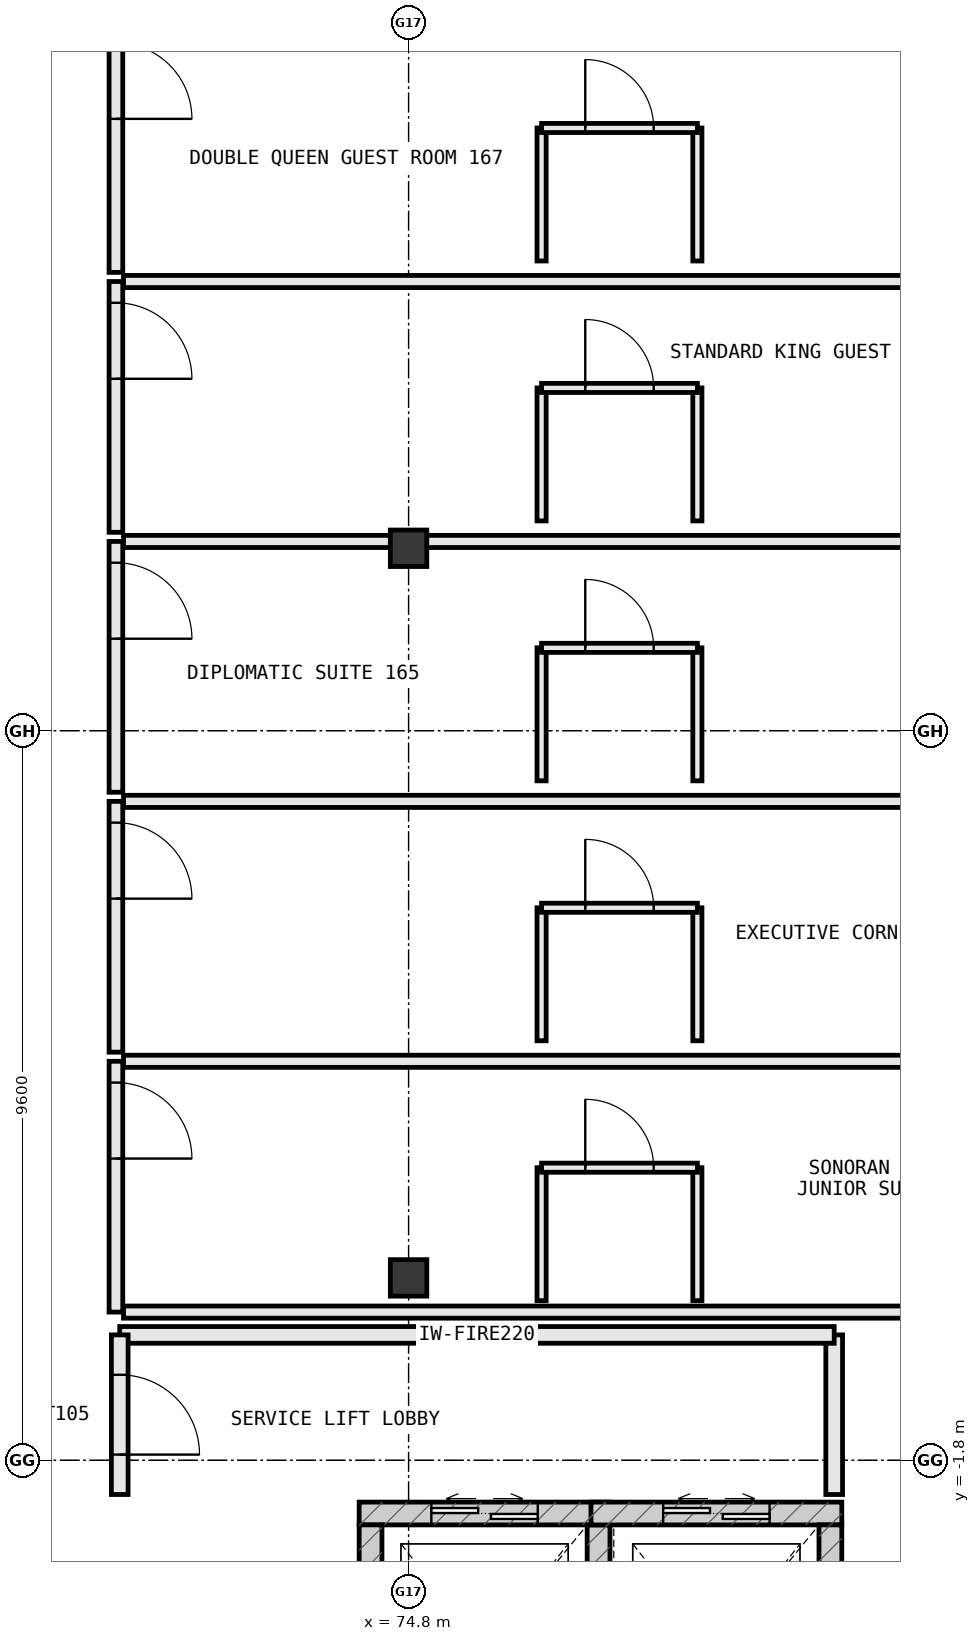
"""IFC4 building model, lengths in metres.
Left out: names, types, materials, properties, quantities, classifications, styles, units other than length and angle.
Written with IfcOpenShell. Run it as: python <this file> out.ifc"""

import sys

from ifc_helpers import new_model, si_unit, direction, frame, frame_2d, origin, origin_2d, place, context, subcontext, project, spatial, rectangle, extrude, element, fill, save


model = new_model("IFC4")
c1 = context("Model", 3, precision=1e-05, world=origin(), true_north=direction((0.0, 1.0)))
c2 = subcontext(c1, "Body", "Model", "MODEL_VIEW")
j1 = project(units=[si_unit("LENGTHUNIT", "METRE"), si_unit("PLANEANGLEUNIT", "RADIAN")], contexts=[c1])
p1 = place(None, origin())
s1 = spatial("IfcSite", under=j1, at=p1, CompositionType="ELEMENT")
p2 = place(p1, origin())
s2 = spatial("IfcBuilding", under=s1, at=p2, CompositionType="ELEMENT")
p3 = place(p2, frame((0.0, 0.0, 23.8)))
s3 = spatial("IfcBuildingStorey", under=s2, at=p3, CompositionType="ELEMENT", Elevation=23.8)
for number, where, z_axis, x_axis in (
    (1, (74.8, 0.6, 0.0), (0.0, 0.0, 1.0), (1.0, 0.0, 0.0)),
    (2, (74.8, 10.2, 0.0), (0.0, 0.0, 1.0), (1.0, 0.0, 0.0)),
):
    element("IfcColumn", number, at=place(p3, frame(where, z_axis=z_axis, x_axis=x_axis)), inside=s3, PredefinedType="COLUMN", context=c2, shape_type="SweptSolid", body=[
        extrude(rectangle(XDim=0.48, YDim=0.48, at=origin_2d()), origin(), (0.0, 0.0, 1.0), 3.8),
    ])
p4 = place(p3, frame((77.45, -2.5, 0.0), z_axis=(0.0, 0.0, 1.0), x_axis=(-1.0, 0.0, 0.0)))
e3 = element("IfcWall", 3, at=p4, inside=s3, PredefinedType="SHEAR", context=c2, shape_type="SweptSolid", body=[
    extrude(rectangle(XDim=3.3, YDim=0.3, at=frame_2d((1.65, 0.0))), origin(), (0.0, 0.0, 1.0), 3.8),
])
p5 = place(p4, frame((0.95, 0.0, 0.0)))
e4 = element("IfcOpeningElement", 4, at=p5, cuts=e3, PredefinedType="OPENING", context=c2, shape_type="SweptSolid", body=[
    extrude(rectangle(XDim=1.4, YDim=2.2, at=frame_2d((0.7, 1.1))), frame((0.0, 0.162, 0.0), z_axis=(0.0, -1.0, 0.0), x_axis=(1.0, 0.0, 0.0)), (0.0, 0.0, 1.0), 0.324),
])
for number, where, z_axis, x_axis in (
    (5, (77.3, -5.95, 0.0), (0.0, 0.0, 1.0), (0.0, 1.0, 0.0)),
    (6, (74.3, -2.65, 0.0), (0.0, 0.0, 1.0), (0.0, -1.0, 0.0)),
):
    element("IfcWall", number, at=place(p3, frame(where, z_axis=z_axis, x_axis=x_axis)), inside=s3, PredefinedType="SHEAR", context=c2, shape_type="SweptSolid", body=[
        extrude(rectangle(XDim=3.3, YDim=0.3, at=frame_2d((1.65, 0.0))), origin(), (0.0, 0.0, 1.0), 3.8),
    ])
p6 = place(p3, frame((80.5, -2.5, 0.0), z_axis=(0.0, 0.0, 1.0), x_axis=(-1.0, 0.0, 0.0)))
e7 = element("IfcWall", 7, at=p6, inside=s3, PredefinedType="SHEAR", context=c2, shape_type="SweptSolid", body=[
    extrude(rectangle(XDim=3.3, YDim=0.3, at=frame_2d((1.65, 0.0))), origin(), (0.0, 0.0, 1.0), 3.8),
])
p7 = place(p6, frame((0.95, 0.0, 0.0)))
e8 = element("IfcOpeningElement", 8, at=p7, cuts=e7, PredefinedType="OPENING", context=c2, shape_type="SweptSolid", body=[
    extrude(rectangle(XDim=1.4, YDim=2.2, at=frame_2d((0.7, 1.1))), frame((0.0, 0.162, 0.0), z_axis=(0.0, -1.0, 0.0), x_axis=(1.0, 0.0, 0.0)), (0.0, 0.0, 1.0), 0.324),
])
p8 = place(p3, frame((80.35, -5.95, 0.0), z_axis=(0.0, 0.0, 1.0), x_axis=(0.0, 1.0, 0.0)))
e9 = element("IfcWall", 9, at=p8, inside=s3, PredefinedType="SHEAR", context=c2, shape_type="SweptSolid", body=[
    extrude(rectangle(XDim=3.3, YDim=0.3, at=frame_2d((1.65, 0.0))), origin(), (0.0, 0.0, 1.0), 3.8),
])
p9 = place(p3, frame((80.4, -2.25, 0.0), z_axis=(0.0, 0.0, 1.0), x_axis=(0.0, 1.0, 0.0)))
e10 = element("IfcWall", 10, at=p9, inside=s3, PredefinedType="STANDARD", context=c2, shape_type="SweptSolid", body=[
    extrude(rectangle(XDim=2.1, YDim=0.22, at=frame_2d((1.05, 0.0))), origin(), (0.0, 0.0, 1.0), 3.55),
])
p10 = place(p3, frame((80.4, -0.15, 0.0), z_axis=(0.0, 0.0, 1.0), x_axis=(-1.0, 0.0, 0.0)))
e11 = element("IfcWall", 11, at=p10, inside=s3, PredefinedType="STANDARD", context=c2, shape_type="SweptSolid", body=[
    extrude(rectangle(XDim=9.4, YDim=0.22, at=frame_2d((4.7, 0.0))), origin(), (0.0, 0.0, 1.0), 3.55),
])
p11 = place(p3, frame((71.0, -0.15, 0.0), z_axis=(0.0, 0.0, 1.0), x_axis=(0.0, -1.0, 0.0)))
e12 = element("IfcWall", 12, at=p11, inside=s3, PredefinedType="STANDARD", context=c2, shape_type="SweptSolid", body=[
    extrude(rectangle(XDim=2.1, YDim=0.22, at=frame_2d((1.05, 0.0))), origin(), (0.0, 0.0, 1.0), 3.55),
])
p12 = place(p11, frame((0.525, 0.0, 0.0)))
e13 = element("IfcOpeningElement", 13, at=p12, cuts=e12, PredefinedType="OPENING", context=c2, shape_type="SweptSolid", body=[
    extrude(rectangle(XDim=1.05, YDim=2.2, at=frame_2d((0.525, 1.1))), frame((0.0, 0.122, 0.0), z_axis=(0.0, -1.0, 0.0), x_axis=(1.0, 0.0, 0.0)), (0.0, 0.0, 1.0), 0.244),
])
p13 = place(p3, frame((70.95, 3.45, 0.0), z_axis=(0.0, 0.0, 1.0), x_axis=(0.0, -1.0, 0.0)))
e14 = element("IfcWall", 14, at=p13, inside=s3, PredefinedType="PARTITIONING", context=c2, shape_type="SweptSolid", body=[
    extrude(rectangle(XDim=3.3, YDim=0.18, at=frame_2d((1.65, 0.0))), origin(), (0.0, 0.0, 1.0), 3.55),
])
p14 = place(p13, frame((0.28, 0.0, 0.0)))
e15 = element("IfcOpeningElement", 15, at=p14, cuts=e14, PredefinedType="OPENING", context=c2, shape_type="SweptSolid", body=[
    extrude(rectangle(XDim=1.0, YDim=2.2, at=frame_2d((0.5, 1.1))), frame((0.0, 0.102, 0.0), z_axis=(0.0, -1.0, 0.0), x_axis=(1.0, 0.0, 0.0)), (0.0, 0.0, 1.0), 0.204),
])
for number, where, z_axis, x_axis in (
    (16, (71.05, 0.15, 0.0), (0.0, 0.0, 1.0), (1.0, 0.0, 0.0)),
    (17, (71.05, 3.45, 0.0), (0.0, 0.0, 1.0), (1.0, 0.0, 0.0)),
):
    element("IfcWall", number, at=place(p3, frame(where, z_axis=z_axis, x_axis=x_axis)), inside=s3, PredefinedType="PARTITIONING", context=c2, shape_type="SweptSolid", body=[
        extrude(rectangle(XDim=12.79, YDim=0.16, at=frame_2d((6.395, 0.0))), origin(), (0.0, 0.0, 1.0), 3.55),
    ])
for number, where, z_axis, x_axis in (
    (18, (76.55, 0.3, 0.0), (0.0, 0.0, 1.0), (0.0, 1.0, 0.0)),
    (19, (78.6, 0.3, 0.0), (0.0, 0.0, 1.0), (0.0, 1.0, 0.0)),
):
    element("IfcWall", number, at=place(p3, frame(where, z_axis=z_axis, x_axis=x_axis)), inside=s3, PredefinedType="PARTITIONING", context=c2, shape_type="SweptSolid", body=[
        extrude(rectangle(XDim=1.75, YDim=0.12, at=frame_2d((0.875, 0.0))), origin(), (0.0, 0.0, 1.0), 3.55),
    ])
p15 = place(p3, frame((76.55, 2.05, 0.0), z_axis=(0.0, 0.0, 1.0), x_axis=(1.0, 0.0, 0.0)))
e20 = element("IfcWall", 20, at=p15, inside=s3, PredefinedType="PARTITIONING", context=c2, shape_type="SweptSolid", body=[
    extrude(rectangle(XDim=2.05, YDim=0.12, at=frame_2d((1.025, 0.0))), origin(), (0.0, 0.0, 1.0), 3.55),
])
p16 = place(p15, frame((0.575, 0.0, 0.0)))
e21 = element("IfcOpeningElement", 21, at=p16, cuts=e20, PredefinedType="OPENING", context=c2, shape_type="SweptSolid", body=[
    extrude(rectangle(XDim=0.9, YDim=2.15, at=frame_2d((0.45, 1.075))), frame((0.0, 0.072, 0.0), z_axis=(0.0, -1.0, 0.0), x_axis=(1.0, 0.0, 0.0)), (0.0, 0.0, 1.0), 0.144),
])
p17 = place(p3, frame((70.95, 6.87, 0.0), z_axis=(0.0, 0.0, 1.0), x_axis=(0.0, -1.0, 0.0)))
e22 = element("IfcWall", 22, at=p17, inside=s3, PredefinedType="PARTITIONING", context=c2, shape_type="SweptSolid", body=[
    extrude(rectangle(XDim=3.3, YDim=0.18, at=frame_2d((1.65, 0.0))), origin(), (0.0, 0.0, 1.0), 3.55),
])
p18 = place(p17, frame((0.28, 0.0, 0.0)))
e23 = element("IfcOpeningElement", 23, at=p18, cuts=e22, PredefinedType="OPENING", context=c2, shape_type="SweptSolid", body=[
    extrude(rectangle(XDim=1.0, YDim=2.2, at=frame_2d((0.5, 1.1))), frame((0.0, 0.102, 0.0), z_axis=(0.0, -1.0, 0.0), x_axis=(1.0, 0.0, 0.0)), (0.0, 0.0, 1.0), 0.204),
])
p19 = place(p3, frame((71.05, 6.87, 0.0), z_axis=(0.0, 0.0, 1.0), x_axis=(1.0, 0.0, 0.0)))
e24 = element("IfcWall", 24, at=p19, inside=s3, PredefinedType="PARTITIONING", context=c2, shape_type="SweptSolid", body=[
    extrude(rectangle(XDim=12.79, YDim=0.16, at=frame_2d((6.395, 0.0))), origin(), (0.0, 0.0, 1.0), 3.55),
])
for number, where, z_axis, x_axis in (
    (25, (76.55, 3.72, 0.0), (0.0, 0.0, 1.0), (0.0, 1.0, 0.0)),
    (26, (78.6, 3.72, 0.0), (0.0, 0.0, 1.0), (0.0, 1.0, 0.0)),
):
    element("IfcWall", number, at=place(p3, frame(where, z_axis=z_axis, x_axis=x_axis)), inside=s3, PredefinedType="PARTITIONING", context=c2, shape_type="SweptSolid", body=[
        extrude(rectangle(XDim=1.75, YDim=0.12, at=frame_2d((0.875, 0.0))), origin(), (0.0, 0.0, 1.0), 3.55),
    ])
p20 = place(p3, frame((76.55, 5.47, 0.0), z_axis=(0.0, 0.0, 1.0), x_axis=(1.0, 0.0, 0.0)))
e27 = element("IfcWall", 27, at=p20, inside=s3, PredefinedType="PARTITIONING", context=c2, shape_type="SweptSolid", body=[
    extrude(rectangle(XDim=2.05, YDim=0.12, at=frame_2d((1.025, 0.0))), origin(), (0.0, 0.0, 1.0), 3.55),
])
p21 = place(p20, frame((0.575, 0.0, 0.0)))
e28 = element("IfcOpeningElement", 28, at=p21, cuts=e27, PredefinedType="OPENING", context=c2, shape_type="SweptSolid", body=[
    extrude(rectangle(XDim=0.9, YDim=2.15, at=frame_2d((0.45, 1.075))), frame((0.0, 0.072, 0.0), z_axis=(0.0, -1.0, 0.0), x_axis=(1.0, 0.0, 0.0)), (0.0, 0.0, 1.0), 0.144),
])
p22 = place(p3, frame((70.95, 10.29, 0.0), z_axis=(0.0, 0.0, 1.0), x_axis=(0.0, -1.0, 0.0)))
e29 = element("IfcWall", 29, at=p22, inside=s3, PredefinedType="PARTITIONING", context=c2, shape_type="SweptSolid", body=[
    extrude(rectangle(XDim=3.3, YDim=0.18, at=frame_2d((1.65, 0.0))), origin(), (0.0, 0.0, 1.0), 3.55),
])
p23 = place(p22, frame((0.28, 0.0, 0.0)))
e30 = element("IfcOpeningElement", 30, at=p23, cuts=e29, PredefinedType="OPENING", context=c2, shape_type="SweptSolid", body=[
    extrude(rectangle(XDim=1.0, YDim=2.2, at=frame_2d((0.5, 1.1))), frame((0.0, 0.102, 0.0), z_axis=(0.0, -1.0, 0.0), x_axis=(1.0, 0.0, 0.0)), (0.0, 0.0, 1.0), 0.204),
])
p24 = place(p3, frame((71.05, 10.29, 0.0), z_axis=(0.0, 0.0, 1.0), x_axis=(1.0, 0.0, 0.0)))
e31 = element("IfcWall", 31, at=p24, inside=s3, PredefinedType="PARTITIONING", context=c2, shape_type="SweptSolid", body=[
    extrude(rectangle(XDim=12.79, YDim=0.16, at=frame_2d((6.395, 0.0))), origin(), (0.0, 0.0, 1.0), 2.905),
])
for number, where, z_axis, x_axis in (
    (32, (76.55, 7.14, 0.0), (0.0, 0.0, 1.0), (0.0, 1.0, 0.0)),
    (33, (78.6, 7.14, 0.0), (0.0, 0.0, 1.0), (0.0, 1.0, 0.0)),
):
    element("IfcWall", number, at=place(p3, frame(where, z_axis=z_axis, x_axis=x_axis)), inside=s3, PredefinedType="PARTITIONING", context=c2, shape_type="SweptSolid", body=[
        extrude(rectangle(XDim=1.75, YDim=0.12, at=frame_2d((0.875, 0.0))), origin(), (0.0, 0.0, 1.0), 3.55),
    ])
p25 = place(p3, frame((76.55, 8.89, 0.0), z_axis=(0.0, 0.0, 1.0), x_axis=(1.0, 0.0, 0.0)))
e34 = element("IfcWall", 34, at=p25, inside=s3, PredefinedType="PARTITIONING", context=c2, shape_type="SweptSolid", body=[
    extrude(rectangle(XDim=2.05, YDim=0.12, at=frame_2d((1.025, 0.0))), origin(), (0.0, 0.0, 1.0), 3.55),
])
p26 = place(p25, frame((0.575, 0.0, 0.0)))
e35 = element("IfcOpeningElement", 35, at=p26, cuts=e34, PredefinedType="OPENING", context=c2, shape_type="SweptSolid", body=[
    extrude(rectangle(XDim=0.9, YDim=2.15, at=frame_2d((0.45, 1.075))), frame((0.0, 0.072, 0.0), z_axis=(0.0, -1.0, 0.0), x_axis=(1.0, 0.0, 0.0)), (0.0, 0.0, 1.0), 0.144),
])
p27 = place(p3, frame((70.95, 13.71, 0.0), z_axis=(0.0, 0.0, 1.0), x_axis=(0.0, -1.0, 0.0)))
e36 = element("IfcWall", 36, at=p27, inside=s3, PredefinedType="PARTITIONING", context=c2, shape_type="SweptSolid", body=[
    extrude(rectangle(XDim=3.3, YDim=0.18, at=frame_2d((1.65, 0.0))), origin(), (0.0, 0.0, 1.0), 3.55),
])
p28 = place(p27, frame((0.28, 0.0, 0.0)))
e37 = element("IfcOpeningElement", 37, at=p28, cuts=e36, PredefinedType="OPENING", context=c2, shape_type="SweptSolid", body=[
    extrude(rectangle(XDim=1.0, YDim=2.2, at=frame_2d((0.5, 1.1))), frame((0.0, 0.102, 0.0), z_axis=(0.0, -1.0, 0.0), x_axis=(1.0, 0.0, 0.0)), (0.0, 0.0, 1.0), 0.204),
])
p29 = place(p3, frame((71.05, 13.71, 0.0), z_axis=(0.0, 0.0, 1.0), x_axis=(1.0, 0.0, 0.0)))
e38 = element("IfcWall", 38, at=p29, inside=s3, PredefinedType="PARTITIONING", context=c2, shape_type="SweptSolid", body=[
    extrude(rectangle(XDim=12.79, YDim=0.16, at=frame_2d((6.395, 0.0))), origin(), (0.0, 0.0, 1.0), 3.55),
])
for number, where, z_axis, x_axis in (
    (39, (76.55, 10.56, 0.0), (0.0, 0.0, 1.0), (0.0, 1.0, 0.0)),
    (40, (78.6, 10.56, 0.0), (0.0, 0.0, 1.0), (0.0, 1.0, 0.0)),
):
    element("IfcWall", number, at=place(p3, frame(where, z_axis=z_axis, x_axis=x_axis)), inside=s3, PredefinedType="PARTITIONING", context=c2, shape_type="SweptSolid", body=[
        extrude(rectangle(XDim=1.75, YDim=0.12, at=frame_2d((0.875, 0.0))), origin(), (0.0, 0.0, 1.0), 3.55),
    ])
p30 = place(p3, frame((76.55, 12.31, 0.0), z_axis=(0.0, 0.0, 1.0), x_axis=(1.0, 0.0, 0.0)))
e41 = element("IfcWall", 41, at=p30, inside=s3, PredefinedType="PARTITIONING", context=c2, shape_type="SweptSolid", body=[
    extrude(rectangle(XDim=2.05, YDim=0.12, at=frame_2d((1.025, 0.0))), origin(), (0.0, 0.0, 1.0), 3.55),
])
p31 = place(p30, frame((0.575, 0.0, 0.0)))
e42 = element("IfcOpeningElement", 42, at=p31, cuts=e41, PredefinedType="OPENING", context=c2, shape_type="SweptSolid", body=[
    extrude(rectangle(XDim=0.9, YDim=2.15, at=frame_2d((0.45, 1.075))), frame((0.0, 0.072, 0.0), z_axis=(0.0, -1.0, 0.0), x_axis=(1.0, 0.0, 0.0)), (0.0, 0.0, 1.0), 0.144),
])
p32 = place(p3, frame((70.95, 17.13, 0.0), z_axis=(0.0, 0.0, 1.0), x_axis=(0.0, -1.0, 0.0)))
e43 = element("IfcWall", 43, at=p32, inside=s3, PredefinedType="PARTITIONING", context=c2, shape_type="SweptSolid", body=[
    extrude(rectangle(XDim=3.3, YDim=0.18, at=frame_2d((1.65, 0.0))), origin(), (0.0, 0.0, 1.0), 3.55),
])
p33 = place(p32, frame((0.28, 0.0, 0.0)))
e44 = element("IfcOpeningElement", 44, at=p33, cuts=e43, PredefinedType="OPENING", context=c2, shape_type="SweptSolid", body=[
    extrude(rectangle(XDim=1.0, YDim=2.2, at=frame_2d((0.5, 1.1))), frame((0.0, 0.102, 0.0), z_axis=(0.0, -1.0, 0.0), x_axis=(1.0, 0.0, 0.0)), (0.0, 0.0, 1.0), 0.204),
])
for number, where, z_axis, x_axis in (
    (45, (76.55, 13.98, 0.0), (0.0, 0.0, 1.0), (0.0, 1.0, 0.0)),
    (46, (78.6, 13.98, 0.0), (0.0, 0.0, 1.0), (0.0, 1.0, 0.0)),
):
    element("IfcWall", number, at=place(p3, frame(where, z_axis=z_axis, x_axis=x_axis)), inside=s3, PredefinedType="PARTITIONING", context=c2, shape_type="SweptSolid", body=[
        extrude(rectangle(XDim=1.75, YDim=0.12, at=frame_2d((0.875, 0.0))), origin(), (0.0, 0.0, 1.0), 3.55),
    ])
p34 = place(p3, frame((76.55, 15.73, 0.0), z_axis=(0.0, 0.0, 1.0), x_axis=(1.0, 0.0, 0.0)))
e47 = element("IfcWall", 47, at=p34, inside=s3, PredefinedType="PARTITIONING", context=c2, shape_type="SweptSolid", body=[
    extrude(rectangle(XDim=2.05, YDim=0.12, at=frame_2d((1.025, 0.0))), origin(), (0.0, 0.0, 1.0), 3.55),
])
p35 = place(p34, frame((0.575, 0.0, 0.0)))
e48 = element("IfcOpeningElement", 48, at=p35, cuts=e47, PredefinedType="OPENING", context=c2, shape_type="SweptSolid", body=[
    extrude(rectangle(XDim=0.9, YDim=2.15, at=frame_2d((0.45, 1.075))), frame((0.0, 0.072, 0.0), z_axis=(0.0, -1.0, 0.0), x_axis=(1.0, 0.0, 0.0)), (0.0, 0.0, 1.0), 0.144),
])
p36 = place(p5, origin())
e49 = element("IfcDoor", 49, at=p36, inside=s3, OperationType="DOUBLE_DOOR_SLIDING", PredefinedType="DOOR", context=c2, shape_type="SweptSolid", body=[
    extrude(rectangle(XDim=1.4, YDim=2.2, at=frame_2d((0.7, 1.1))), frame((0.0, 0.025, 0.0), z_axis=(0.0, -1.0, 0.0), x_axis=(1.0, 0.0, 0.0)), (0.0, 0.0, 1.0), 0.05),
])
fill(e4, e49)
p37 = place(p7, origin())
e50 = element("IfcDoor", 50, at=p37, inside=s3, OperationType="DOUBLE_DOOR_SLIDING", PredefinedType="DOOR", context=c2, shape_type="SweptSolid", body=[
    extrude(rectangle(XDim=1.4, YDim=2.2, at=frame_2d((0.7, 1.1))), frame((0.0, 0.025, 0.0), z_axis=(0.0, -1.0, 0.0), x_axis=(1.0, 0.0, 0.0)), (0.0, 0.0, 1.0), 0.05),
])
fill(e8, e50)
p38 = place(p12, origin())
e51 = element("IfcDoor", 51, at=p38, inside=s3, OperationType="SINGLE_SWING_RIGHT", PredefinedType="DOOR", context=c2, shape_type="SweptSolid", body=[
    extrude(rectangle(XDim=1.05, YDim=2.2, at=frame_2d((0.525, 1.1))), frame((0.0, 0.025, 0.0), z_axis=(0.0, -1.0, 0.0), x_axis=(1.0, 0.0, 0.0)), (0.0, 0.0, 1.0), 0.05),
])
fill(e13, e51)
p39 = place(p14, origin())
e52 = element("IfcDoor", 52, at=p39, inside=s3, OperationType="SINGLE_SWING_RIGHT", PredefinedType="DOOR", context=c2, shape_type="SweptSolid", body=[
    extrude(rectangle(XDim=1.0, YDim=2.2, at=frame_2d((0.5, 1.1))), frame((0.0, 0.025, 0.0), z_axis=(0.0, -1.0, 0.0), x_axis=(1.0, 0.0, 0.0)), (0.0, 0.0, 1.0), 0.05),
])
fill(e15, e52)
p40 = place(p16, origin())
e53 = element("IfcDoor", 53, at=p40, inside=s3, OperationType="SINGLE_SWING_LEFT", PredefinedType="DOOR", context=c2, shape_type="SweptSolid", body=[
    extrude(rectangle(XDim=0.9, YDim=2.15, at=frame_2d((0.45, 1.075))), frame((0.0, 0.025, 0.0), z_axis=(0.0, -1.0, 0.0), x_axis=(1.0, 0.0, 0.0)), (0.0, 0.0, 1.0), 0.05),
])
fill(e21, e53)
p41 = place(p18, origin())
e54 = element("IfcDoor", 54, at=p41, inside=s3, OperationType="SINGLE_SWING_RIGHT", PredefinedType="DOOR", context=c2, shape_type="SweptSolid", body=[
    extrude(rectangle(XDim=1.0, YDim=2.2, at=frame_2d((0.5, 1.1))), frame((0.0, 0.025, 0.0), z_axis=(0.0, -1.0, 0.0), x_axis=(1.0, 0.0, 0.0)), (0.0, 0.0, 1.0), 0.05),
])
fill(e23, e54)
p42 = place(p21, origin())
e55 = element("IfcDoor", 55, at=p42, inside=s3, OperationType="SINGLE_SWING_LEFT", PredefinedType="DOOR", context=c2, shape_type="SweptSolid", body=[
    extrude(rectangle(XDim=0.9, YDim=2.15, at=frame_2d((0.45, 1.075))), frame((0.0, 0.025, 0.0), z_axis=(0.0, -1.0, 0.0), x_axis=(1.0, 0.0, 0.0)), (0.0, 0.0, 1.0), 0.05),
])
fill(e28, e55)
p43 = place(p23, origin())
e56 = element("IfcDoor", 56, at=p43, inside=s3, OperationType="SINGLE_SWING_RIGHT", PredefinedType="DOOR", context=c2, shape_type="SweptSolid", body=[
    extrude(rectangle(XDim=1.0, YDim=2.2, at=frame_2d((0.5, 1.1))), frame((0.0, 0.025, 0.0), z_axis=(0.0, -1.0, 0.0), x_axis=(1.0, 0.0, 0.0)), (0.0, 0.0, 1.0), 0.05),
])
fill(e30, e56)
p44 = place(p26, origin())
e57 = element("IfcDoor", 57, at=p44, inside=s3, OperationType="SINGLE_SWING_LEFT", PredefinedType="DOOR", context=c2, shape_type="SweptSolid", body=[
    extrude(rectangle(XDim=0.9, YDim=2.15, at=frame_2d((0.45, 1.075))), frame((0.0, 0.025, 0.0), z_axis=(0.0, -1.0, 0.0), x_axis=(1.0, 0.0, 0.0)), (0.0, 0.0, 1.0), 0.05),
])
fill(e35, e57)
p45 = place(p28, origin())
e58 = element("IfcDoor", 58, at=p45, inside=s3, OperationType="SINGLE_SWING_RIGHT", PredefinedType="DOOR", context=c2, shape_type="SweptSolid", body=[
    extrude(rectangle(XDim=1.0, YDim=2.2, at=frame_2d((0.5, 1.1))), frame((0.0, 0.025, 0.0), z_axis=(0.0, -1.0, 0.0), x_axis=(1.0, 0.0, 0.0)), (0.0, 0.0, 1.0), 0.05),
])
fill(e37, e58)
p46 = place(p31, origin())
e59 = element("IfcDoor", 59, at=p46, inside=s3, OperationType="SINGLE_SWING_LEFT", PredefinedType="DOOR", context=c2, shape_type="SweptSolid", body=[
    extrude(rectangle(XDim=0.9, YDim=2.15, at=frame_2d((0.45, 1.075))), frame((0.0, 0.025, 0.0), z_axis=(0.0, -1.0, 0.0), x_axis=(1.0, 0.0, 0.0)), (0.0, 0.0, 1.0), 0.05),
])
fill(e42, e59)
p47 = place(p33, origin())
e60 = element("IfcDoor", 60, at=p47, inside=s3, OperationType="SINGLE_SWING_RIGHT", PredefinedType="DOOR", context=c2, shape_type="SweptSolid", body=[
    extrude(rectangle(XDim=1.0, YDim=2.2, at=frame_2d((0.5, 1.1))), frame((0.0, 0.025, 0.0), z_axis=(0.0, -1.0, 0.0), x_axis=(1.0, 0.0, 0.0)), (0.0, 0.0, 1.0), 0.05),
])
fill(e44, e60)
p48 = place(p35, origin())
e61 = element("IfcDoor", 61, at=p48, inside=s3, OperationType="SINGLE_SWING_LEFT", PredefinedType="DOOR", context=c2, shape_type="SweptSolid", body=[
    extrude(rectangle(XDim=0.9, YDim=2.15, at=frame_2d((0.45, 1.075))), frame((0.0, 0.025, 0.0), z_axis=(0.0, -1.0, 0.0), x_axis=(1.0, 0.0, 0.0)), (0.0, 0.0, 1.0), 0.05),
])
fill(e48, e61)
save(model, sys.argv[1])
